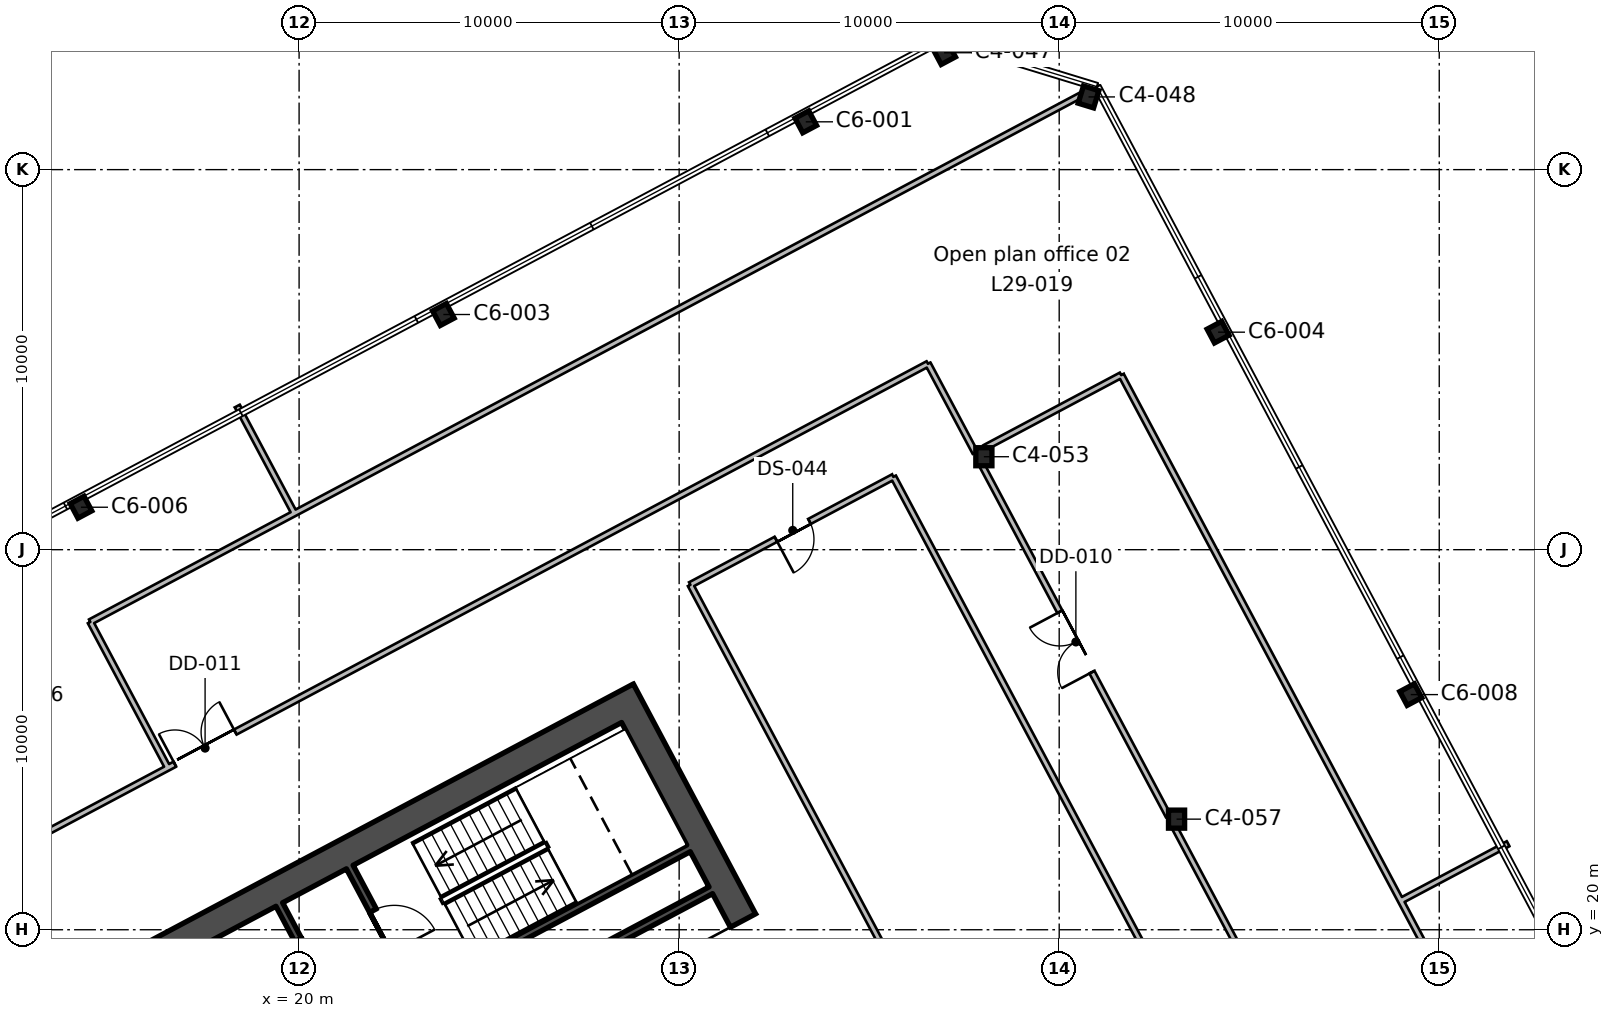
"""IFC4 building model, lengths in metres.
Left out: names, types, materials, properties, quantities, classifications, styles, units other than length and angle.
Written with IfcOpenShell. Run it as: python <this file> out.ifc"""

import sys

from ifc_helpers import new_model, si_unit, direction, frame, frame_2d, origin, origin_2d, place, context, subcontext, project, spatial, rectangle, i_section, extrude, element, fill, save


model = new_model("IFC4")
c1 = context("Model", 3, precision=1e-05, world=origin(), true_north=direction((0.0, 1.0)))
c2 = subcontext(c1, "Body", "Model", "MODEL_VIEW")
j1 = project(units=[si_unit("LENGTHUNIT", "METRE"), si_unit("PLANEANGLEUNIT", "RADIAN")], contexts=[c1])
p1 = place(None, origin())
s1 = spatial("IfcSite", under=j1, at=p1, CompositionType="ELEMENT")
p2 = place(p1, origin())
s2 = spatial("IfcBuilding", under=s1, at=p2, CompositionType="ELEMENT")
p3 = place(p2, frame((0.0, 0.0, 142.2)))
s3 = spatial("IfcBuildingStorey", under=s2, at=p3, CompositionType="ELEMENT", Elevation=142.2)
p4 = place(p3, frame((43.088, 22.91, 0.0), z_axis=(0.0, 0.0, 1.0), x_axis=(1.0, 0.0, 0.0)))
e1 = element("IfcColumn", 1, at=p4, inside=s3, PredefinedType="COLUMN", context=c2, shape_type="SweptSolid", body=[
    extrude(i_section(OverallWidth=0.424, OverallDepth=0.475, WebThickness=0.048, FlangeThickness=0.077, FilletRadius=0.015, at=origin_2d()), origin(), (0.0, 0.0, 1.0), 4.0),
])
for number, where, z_axis, x_axis in (
    (2, (49.251, 26.187, 0.0), (0.0, 0.0, 1.0), (-0.469, 0.883, 0.0)),
    (3, (14.261, 31.117, 0.0), (0.0, 0.0, 1.0), (-0.883, -0.469, 0.0)),
):
    element("IfcColumn", number, at=place(p3, frame(where, z_axis=z_axis, x_axis=x_axis)), inside=s3, PredefinedType="COLUMN", context=c2, shape_type="SweptSolid", body=[
        extrude(i_section(OverallWidth=0.412, OverallDepth=0.434, WebThickness=0.036, FlangeThickness=0.057, FilletRadius=0.015, at=origin_2d()), origin(), (0.0, 0.0, 1.0), 4.0),
    ])
p5 = place(p3, frame((38.018, 32.446, 0.0), z_axis=(0.0, 0.0, 1.0), x_axis=(1.0, 0.0, 0.0)))
e4 = element("IfcColumn", 4, at=p5, inside=s3, PredefinedType="COLUMN", context=c2, shape_type="SweptSolid", body=[
    extrude(i_section(OverallWidth=0.424, OverallDepth=0.475, WebThickness=0.048, FlangeThickness=0.077, FilletRadius=0.015, at=origin_2d()), origin(), (0.0, 0.0, 1.0), 4.0),
])
for number, where, z_axis, x_axis in (
    (5, (44.181, 35.723, 0.0), (0.0, 0.0, 1.0), (-0.469, 0.883, 0.0)),
    (6, (23.796, 36.188, 0.0), (0.0, 0.0, 1.0), (-0.883, -0.469, 0.0)),
    (7, (33.332, 41.258, 0.0), (0.0, 0.0, 1.0), (-0.883, -0.469, 0.0)),
):
    element("IfcColumn", number, at=place(p3, frame(where, z_axis=z_axis, x_axis=x_axis)), inside=s3, PredefinedType="COLUMN", context=c2, shape_type="SweptSolid", body=[
        extrude(i_section(OverallWidth=0.412, OverallDepth=0.434, WebThickness=0.036, FlangeThickness=0.057, FilletRadius=0.015, at=origin_2d()), origin(), (0.0, 0.0, 1.0), 4.0),
    ])
for number, where, z_axis, x_axis in (
    (8, (40.772, 41.913, 0.0), (0.0, 0.0, 1.0), (-0.956, 0.292, 0.0)),
    (9, (36.971, 43.076, 0.0), (0.0, 0.0, 1.0), (-0.883, -0.469, 0.0)),
):
    element("IfcColumn", number, at=place(p3, frame(where, z_axis=z_axis, x_axis=x_axis)), inside=s3, PredefinedType="COLUMN", context=c2, shape_type="SweptSolid", body=[
        extrude(i_section(OverallWidth=0.424, OverallDepth=0.475, WebThickness=0.048, FlangeThickness=0.077, FilletRadius=0.015, at=origin_2d()), origin(), (0.0, 0.0, 1.0), 4.0),
    ])
p6 = place(p3, frame((37.713, 8.896, 0.0), z_axis=(0.0, 0.0, 1.0), x_axis=(-0.469469918705, 0.88294846703, 0.0)))
e10 = element("IfcWall", 10, at=p6, inside=s3, PredefinedType="SHEAR", context=c2, shape_type="SweptSolid", body=[
    extrude(rectangle(XDim=19.7, YDim=0.75, at=frame_2d((9.85, 0.0))), origin(), (0.0, 0.0, 1.0), 4.0),
])
p7 = place(p6, frame((10.45, 0.0, 0.0)))
e11 = element("IfcOpeningElement", 11, at=p7, cuts=e10, PredefinedType="OPENING", context=c2, shape_type="SweptSolid", body=[
    extrude(rectangle(XDim=2.4, YDim=2.4, at=frame_2d((1.2, 1.2))), frame((0.0, 0.385, 0.0), z_axis=(0.0, -1.0, 0.0), x_axis=(1.0, 0.0, 0.0)), (0.0, 0.0, 1.0), 0.77),
])
p8 = place(p3, frame((10.474, 16.3, 0.0), z_axis=(0.0, 0.0, 1.0), x_axis=(0.88295010195, 0.469466843842, 0.0)))
e12 = element("IfcWall", 12, at=p8, inside=s3, PredefinedType="SHEAR", context=c2, shape_type="SweptSolid", body=[
    extrude(rectangle(XDim=20.2, YDim=0.75, at=frame_2d((10.1, 0.0))), origin(), (0.0, 0.0, 1.0), 4.0),
])
p9 = place(p3, frame((22.906, 14.218, 0.0), z_axis=(0.0, 0.0, 1.0), x_axis=(-0.469480409012, 0.88294288918, 0.0)))
e13 = element("IfcWall", 13, at=p9, inside=s3, PredefinedType="SHEAR", context=c2, shape_type="SweptSolid", body=[
    extrude(rectangle(XDim=7.3, YDim=0.2, at=frame_2d((3.65, 0.0))), origin(), (0.0, 0.0, 1.0), 4.0),
])
p10 = place(p9, frame((2.85, 0.0, 0.0)))
e14 = element("IfcOpeningElement", 14, at=p10, cuts=e13, PredefinedType="OPENING", context=c2, shape_type="SweptSolid", body=[
    extrude(rectangle(XDim=0.9, YDim=2.1, at=frame_2d((0.45, 1.05))), frame((0.0, 0.11, 0.0), z_axis=(0.0, -1.0, 0.0), x_axis=(1.0, 0.0, 0.0)), (0.0, 0.0, 1.0), 0.22),
])
p11 = place(p9, frame((5.35, 0.0, 0.0)))
e15 = element("IfcOpeningElement", 15, at=p11, cuts=e13, PredefinedType="OPENING", context=c2, shape_type="SweptSolid", body=[
    extrude(rectangle(XDim=0.9, YDim=2.1, at=frame_2d((0.45, 1.05))), frame((0.0, 0.11, 0.0), z_axis=(0.0, -1.0, 0.0), x_axis=(1.0, 0.0, 0.0)), (0.0, 0.0, 1.0), 0.22),
])
p12 = place(p3, frame((24.76, 15.204, 0.0), z_axis=(0.0, 0.0, 1.0), x_axis=(-0.469494272526, 0.882935517501, 0.0)))
e16 = element("IfcWall", 16, at=p12, inside=s3, PredefinedType="SHEAR", context=c2, shape_type="SweptSolid", body=[
    extrude(rectangle(XDim=7.3, YDim=0.2, at=frame_2d((3.65, 0.0))), origin(), (0.0, 0.0, 1.0), 4.0),
])
p13 = place(p12, frame((4.8, 0.0, 0.0)))
e17 = element("IfcOpeningElement", 17, at=p13, cuts=e16, PredefinedType="OPENING", context=c2, shape_type="SweptSolid", body=[
    extrude(rectangle(XDim=1.2, YDim=2.1, at=frame_2d((0.6, 1.05))), frame((0.0, 0.11, 0.0), z_axis=(0.0, -1.0, 0.0), x_axis=(1.0, 0.0, 0.0)), (0.0, 0.0, 1.0), 0.22),
])
p14 = place(p3, frame((23.769, 17.282, 0.0), z_axis=(0.0, 0.0, 1.0), x_axis=(0.882940221191, 0.469485426614, 0.0)))
e18 = element("IfcWall", 18, at=p14, inside=s3, PredefinedType="SHEAR", context=c2, shape_type="SweptSolid", body=[
    extrude(rectangle(XDim=8.0, YDim=0.2, at=frame_2d((4.0, 0.0))), origin(), (0.0, 0.0, 1.0), 4.0),
])
p15 = place(p3, frame((23.182, 18.385, 0.0), z_axis=(0.0, 0.0, 1.0), x_axis=(0.88295287151, 0.469461634952, 0.0)))
e19 = element("IfcWall", 19, at=p15, inside=s3, PredefinedType="SHEAR", context=c2, shape_type="SweptSolid", body=[
    extrude(rectangle(XDim=8.0, YDim=0.2, at=frame_2d((4.0, 0.0))), origin(), (0.0, 0.0, 1.0), 4.0),
])
p16 = place(p3, frame((0.0, 15.46, 0.0), z_axis=(0.0, 0.0, 1.0), x_axis=(0.882944798935, 0.469476817355, 0.0)))
e20 = element("IfcWall", 20, at=p16, inside=s3, PredefinedType="PARTITIONING", context=c2, shape_type="SweptSolid", body=[
    extrude(rectangle(XDim=23.107, YDim=0.15, at=frame_2d((11.553, 0.0))), origin(), (0.0, 0.0, 1.0), 3.64),
])
p17 = place(p16, frame((18.95, 0.0, 0.0)))
e21 = element("IfcOpeningElement", 21, at=p17, cuts=e20, PredefinedType="OPENING", context=c2, shape_type="SweptSolid", body=[
    extrude(rectangle(XDim=1.8, YDim=2.1, at=frame_2d((0.9, 1.05))), frame((0.0, 0.085, 0.0), z_axis=(0.0, -1.0, 0.0), x_axis=(1.0, 0.0, 0.0)), (0.0, 0.0, 1.0), 0.17),
])
p18 = place(p16, frame((11.05, 0.0, 0.0)))
e22 = element("IfcOpeningElement", 22, at=p18, cuts=e20, PredefinedType="OPENING", context=c2, shape_type="SweptSolid", body=[
    extrude(rectangle(XDim=1.0, YDim=2.1, at=frame_2d((0.5, 1.05))), frame((0.0, 0.085, 0.0), z_axis=(0.0, -1.0, 0.0), x_axis=(1.0, 0.0, 0.0)), (0.0, 0.0, 1.0), 0.17),
])
p19 = place(p3, frame((14.507, 28.1, 0.0), z_axis=(0.0, 0.0, 1.0), x_axis=(0.469255579647, -0.883062399251, 0.0)))
e23 = element("IfcWall", 23, at=p19, inside=s3, PredefinedType="PARTITIONING", context=c2, shape_type="SweptSolid", body=[
    extrude(rectangle(XDim=4.328, YDim=0.15, at=frame_2d((2.164, 0.0))), origin(), (0.0, 0.0, 1.0), 3.64),
])
p20 = place(p3, frame((14.506, 28.099, 0.0), z_axis=(0.0, 0.0, 1.0), x_axis=(0.882949189538, 0.469468559857, 0.0)))
e24 = element("IfcWall", 24, at=p20, inside=s3, PredefinedType="PARTITIONING", context=c2, shape_type="SweptSolid", body=[
    extrude(rectangle(XDim=6.0, YDim=0.15, at=frame_2d((3.0, 0.0))), origin(), (0.0, 0.0, 1.0), 3.64),
])
p21 = place(p3, frame((18.374, 33.78, 0.0), z_axis=(0.0, 0.0, 1.0), x_axis=(0.469685095616, -0.882834022315, 0.0)))
e25 = element("IfcWall", 25, at=p21, inside=s3, PredefinedType="PARTITIONING", context=c2, shape_type="SweptSolid", body=[
    extrude(rectangle(XDim=3.2, YDim=0.15, at=frame_2d((1.6, 0.0))), origin(), (0.0, 0.0, 1.0), 3.64),
])
p22 = place(p3, frame((19.804, 30.916, 0.0), z_axis=(0.0, 0.0, 1.0), x_axis=(0.882942088651, 0.469481914548, 0.0)))
e26 = element("IfcWall", 26, at=p22, inside=s3, PredefinedType="PARTITIONING", context=c2, shape_type="SweptSolid", body=[
    extrude(rectangle(XDim=23.511, YDim=0.15, at=frame_2d((11.756, 0.0))), origin(), (0.0, 0.0, 1.0), 3.64),
])
p23 = place(p3, frame((37.79, 32.555, 0.0), z_axis=(0.0, 0.0, 1.0), x_axis=(-0.469898914502, 0.882720233228, 0.0)))
e27 = element("IfcWall", 27, at=p23, inside=s3, PredefinedType="PARTITIONING", context=c2, shape_type="SweptSolid", body=[
    extrude(rectangle(XDim=2.648, YDim=0.15, at=frame_2d((1.324, 0.0))), origin(), (0.0, 0.0, 1.0), 3.64),
])
p24 = place(p3, frame((20.402, 26.308, 0.0), z_axis=(0.0, 0.0, 1.0), x_axis=(0.882958355843, 0.469451319997, 0.0)))
e28 = element("IfcWall", 28, at=p24, inside=s3, PredefinedType="PARTITIONING", context=c2, shape_type="SweptSolid", body=[
    extrude(rectangle(XDim=18.285, YDim=0.15, at=frame_2d((9.143, 0.0))), origin(), (0.0, 0.0, 1.0), 3.64),
])
p25 = place(p3, frame((37.974, 32.209, 0.0), z_axis=(0.0, 0.0, 1.0), x_axis=(0.469434985691, -0.882967040274, 0.0)))
e29 = element("IfcWall", 29, at=p25, inside=s3, PredefinedType="PARTITIONING", context=c2, shape_type="SweptSolid", body=[
    extrude(rectangle(XDim=10.442, YDim=0.15, at=frame_2d((5.221, 0.0))), origin(), (0.0, 0.0, 1.0), 3.64),
])
p26 = place(p25, frame((4.351, 0.0, 0.0)))
e30 = element("IfcOpeningElement", 30, at=p26, cuts=e29, PredefinedType="OPENING", context=c2, shape_type="SweptSolid", body=[
    extrude(rectangle(XDim=1.8, YDim=2.1, at=frame_2d((0.9, 1.05))), frame((0.0, 0.085, 0.0), z_axis=(0.0, -1.0, 0.0), x_axis=(1.0, 0.0, 0.0)), (0.0, 0.0, 1.0), 0.17),
])
p27 = place(p3, frame((43.044, 22.672, 0.0), z_axis=(0.0, 0.0, 1.0), x_axis=(0.469530755038, -0.882916117235, 0.0)))
e31 = element("IfcWall", 31, at=p27, inside=s3, PredefinedType="PARTITIONING", context=c2, shape_type="SweptSolid", body=[
    extrude(rectangle(XDim=10.44, YDim=0.15, at=frame_2d((5.22, 0.0))), origin(), (0.0, 0.0, 1.0), 3.64),
])
p28 = place(p3, frame((48.953, 20.826, 0.0), z_axis=(0.0, 0.0, 1.0), x_axis=(-0.469481062735, 0.882942541581, 0.0)))
e32 = element("IfcWall", 32, at=p28, inside=s3, PredefinedType="PARTITIONING", context=c2, shape_type="SweptSolid", body=[
    extrude(rectangle(XDim=15.594, YDim=0.15, at=frame_2d((7.797, 0.0))), origin(), (0.0, 0.0, 1.0), 3.64),
])
p29 = place(p3, frame((41.632, 34.594, 0.0), z_axis=(0.0, 0.0, 1.0), x_axis=(-0.88295491585, -0.469457789984, 0.0)))
e33 = element("IfcWall", 33, at=p29, inside=s3, PredefinedType="PARTITIONING", context=c2, shape_type="SweptSolid", body=[
    extrude(rectangle(XDim=4.07, YDim=0.15, at=frame_2d((2.035, 0.0))), origin(), (0.0, 0.0, 1.0), 3.64),
])
p30 = place(p3, frame((48.953, 20.826, 0.0), z_axis=(0.0, 0.0, 1.0), x_axis=(0.469480582042, -0.882942797176, 0.0)))
e34 = element("IfcWall", 34, at=p30, inside=s3, PredefinedType="PARTITIONING", context=c2, shape_type="SweptSolid", body=[
    extrude(rectangle(XDim=13.916, YDim=0.15, at=frame_2d((6.958, 0.0))), origin(), (0.0, 0.0, 1.0), 3.64),
])
p31 = place(p3, frame((51.813, 22.263, 0.0), z_axis=(0.0, 0.0, 1.0), x_axis=(-0.883154243406, -0.469082703107, 0.0)))
e35 = element("IfcWall", 35, at=p31, inside=s3, PredefinedType="PARTITIONING", context=c2, shape_type="SweptSolid", body=[
    extrude(rectangle(XDim=3.2, YDim=0.15, at=frame_2d((1.6, 0.0))), origin(), (0.0, 0.0, 1.0), 3.64),
])
p32 = place(p3, frame((30.296, 29.076, 0.0), z_axis=(0.0, 0.0, 1.0), x_axis=(0.882867405174, 0.469622342826, 0.0)))
e36 = element("IfcWall", 36, at=p32, inside=s3, PredefinedType="PARTITIONING", context=c2, shape_type="SweptSolid", body=[
    extrude(rectangle(XDim=6.05, YDim=0.15, at=frame_2d((3.025, 0.0))), origin(), (0.0, 0.0, 1.0), 3.64),
])
p33 = place(p32, frame((2.55, 0.0, 0.0)))
e37 = element("IfcOpeningElement", 37, at=p33, cuts=e36, PredefinedType="OPENING", context=c2, shape_type="SweptSolid", body=[
    extrude(rectangle(XDim=1.0, YDim=2.1, at=frame_2d((0.5, 1.05))), frame((0.0, 0.085, 0.0), z_axis=(0.0, -1.0, 0.0), x_axis=(1.0, 0.0, 0.0)), (0.0, 0.0, 1.0), 0.17),
])
p34 = place(p3, frame((35.637, 31.917, 0.0), z_axis=(0.0, 0.0, 1.0), x_axis=(0.469463799246, -0.882951720762, 0.0)))
e38 = element("IfcWall", 38, at=p34, inside=s3, PredefinedType="PARTITIONING", context=c2, shape_type="SweptSolid", body=[
    extrude(rectangle(XDim=20.9, YDim=0.15, at=frame_2d((10.45, 0.0))), origin(), (0.0, 0.0, 1.0), 3.64),
])
p35 = place(p3, frame((40.108, 10.623, 0.0), z_axis=(0.0, 0.0, 1.0), x_axis=(-0.469488010228, 0.882938847402, 0.0)))
e39 = element("IfcWall", 39, at=p35, inside=s3, PredefinedType="PARTITIONING", context=c2, shape_type="SweptSolid", body=[
    extrude(rectangle(XDim=20.899, YDim=0.15, at=frame_2d((10.45, 0.0))), origin(), (0.0, 0.0, 1.0), 3.64),
])
p36 = place(p7, origin())
e40 = element("IfcDoor", 40, at=p36, inside=s3, OperationType="DOUBLE_DOOR_SINGLE_SWING", PredefinedType="DOOR", context=c2, shape_type="SweptSolid", body=[
    extrude(rectangle(XDim=2.4, YDim=2.4, at=frame_2d((1.2, 1.2))), frame((0.0, 0.025, 0.0), z_axis=(0.0, -1.0, 0.0), x_axis=(1.0, 0.0, 0.0)), (0.0, 0.0, 1.0), 0.05),
])
fill(e11, e40)
p37 = place(p13, frame((1.2, 0.0, 0.0), z_axis=(0.0, 0.0, 1.0), x_axis=(-1.0, 0.0, 0.0)))
e41 = element("IfcDoor", 41, at=p37, inside=s3, OperationType="SINGLE_SWING_RIGHT", PredefinedType="DOOR", context=c2, shape_type="SweptSolid", body=[
    extrude(rectangle(XDim=1.2, YDim=2.1, at=frame_2d((0.6, 1.05))), frame((0.0, 0.025, 0.0), z_axis=(0.0, -1.0, 0.0), x_axis=(1.0, 0.0, 0.0)), (0.0, 0.0, 1.0), 0.05),
])
fill(e17, e41)
p38 = place(p26, frame((1.8, 0.0, 0.0), z_axis=(0.0, 0.0, 1.0), x_axis=(-1.0, 0.0, 0.0)))
e42 = element("IfcDoor", 42, at=p38, inside=s3, OperationType="DOUBLE_DOOR_SINGLE_SWING", PredefinedType="DOOR", context=c2, shape_type="SweptSolid", body=[
    extrude(rectangle(XDim=1.8, YDim=2.1, at=frame_2d((0.9, 1.05))), frame((0.0, 0.025, 0.0), z_axis=(0.0, -1.0, 0.0), x_axis=(1.0, 0.0, 0.0)), (0.0, 0.0, 1.0), 0.05),
])
fill(e30, e42)
p39 = place(p17, origin())
e43 = element("IfcDoor", 43, at=p39, inside=s3, OperationType="DOUBLE_DOOR_SINGLE_SWING", PredefinedType="DOOR", context=c2, shape_type="SweptSolid", body=[
    extrude(rectangle(XDim=1.8, YDim=2.1, at=frame_2d((0.9, 1.05))), frame((0.0, 0.025, 0.0), z_axis=(0.0, -1.0, 0.0), x_axis=(1.0, 0.0, 0.0)), (0.0, 0.0, 1.0), 0.05),
])
fill(e21, e43)
p40 = place(p33, frame((1.0, 0.0, 0.0), z_axis=(0.0, 0.0, 1.0), x_axis=(-1.0, 0.0, 0.0)))
e44 = element("IfcDoor", 44, at=p40, inside=s3, OperationType="SINGLE_SWING_RIGHT", PredefinedType="DOOR", context=c2, shape_type="SweptSolid", body=[
    extrude(rectangle(XDim=1.0, YDim=2.1, at=frame_2d((0.5, 1.05))), frame((0.0, 0.025, 0.0), z_axis=(0.0, -1.0, 0.0), x_axis=(1.0, 0.0, 0.0)), (0.0, 0.0, 1.0), 0.05),
])
fill(e37, e44)
save(model, sys.argv[1])
